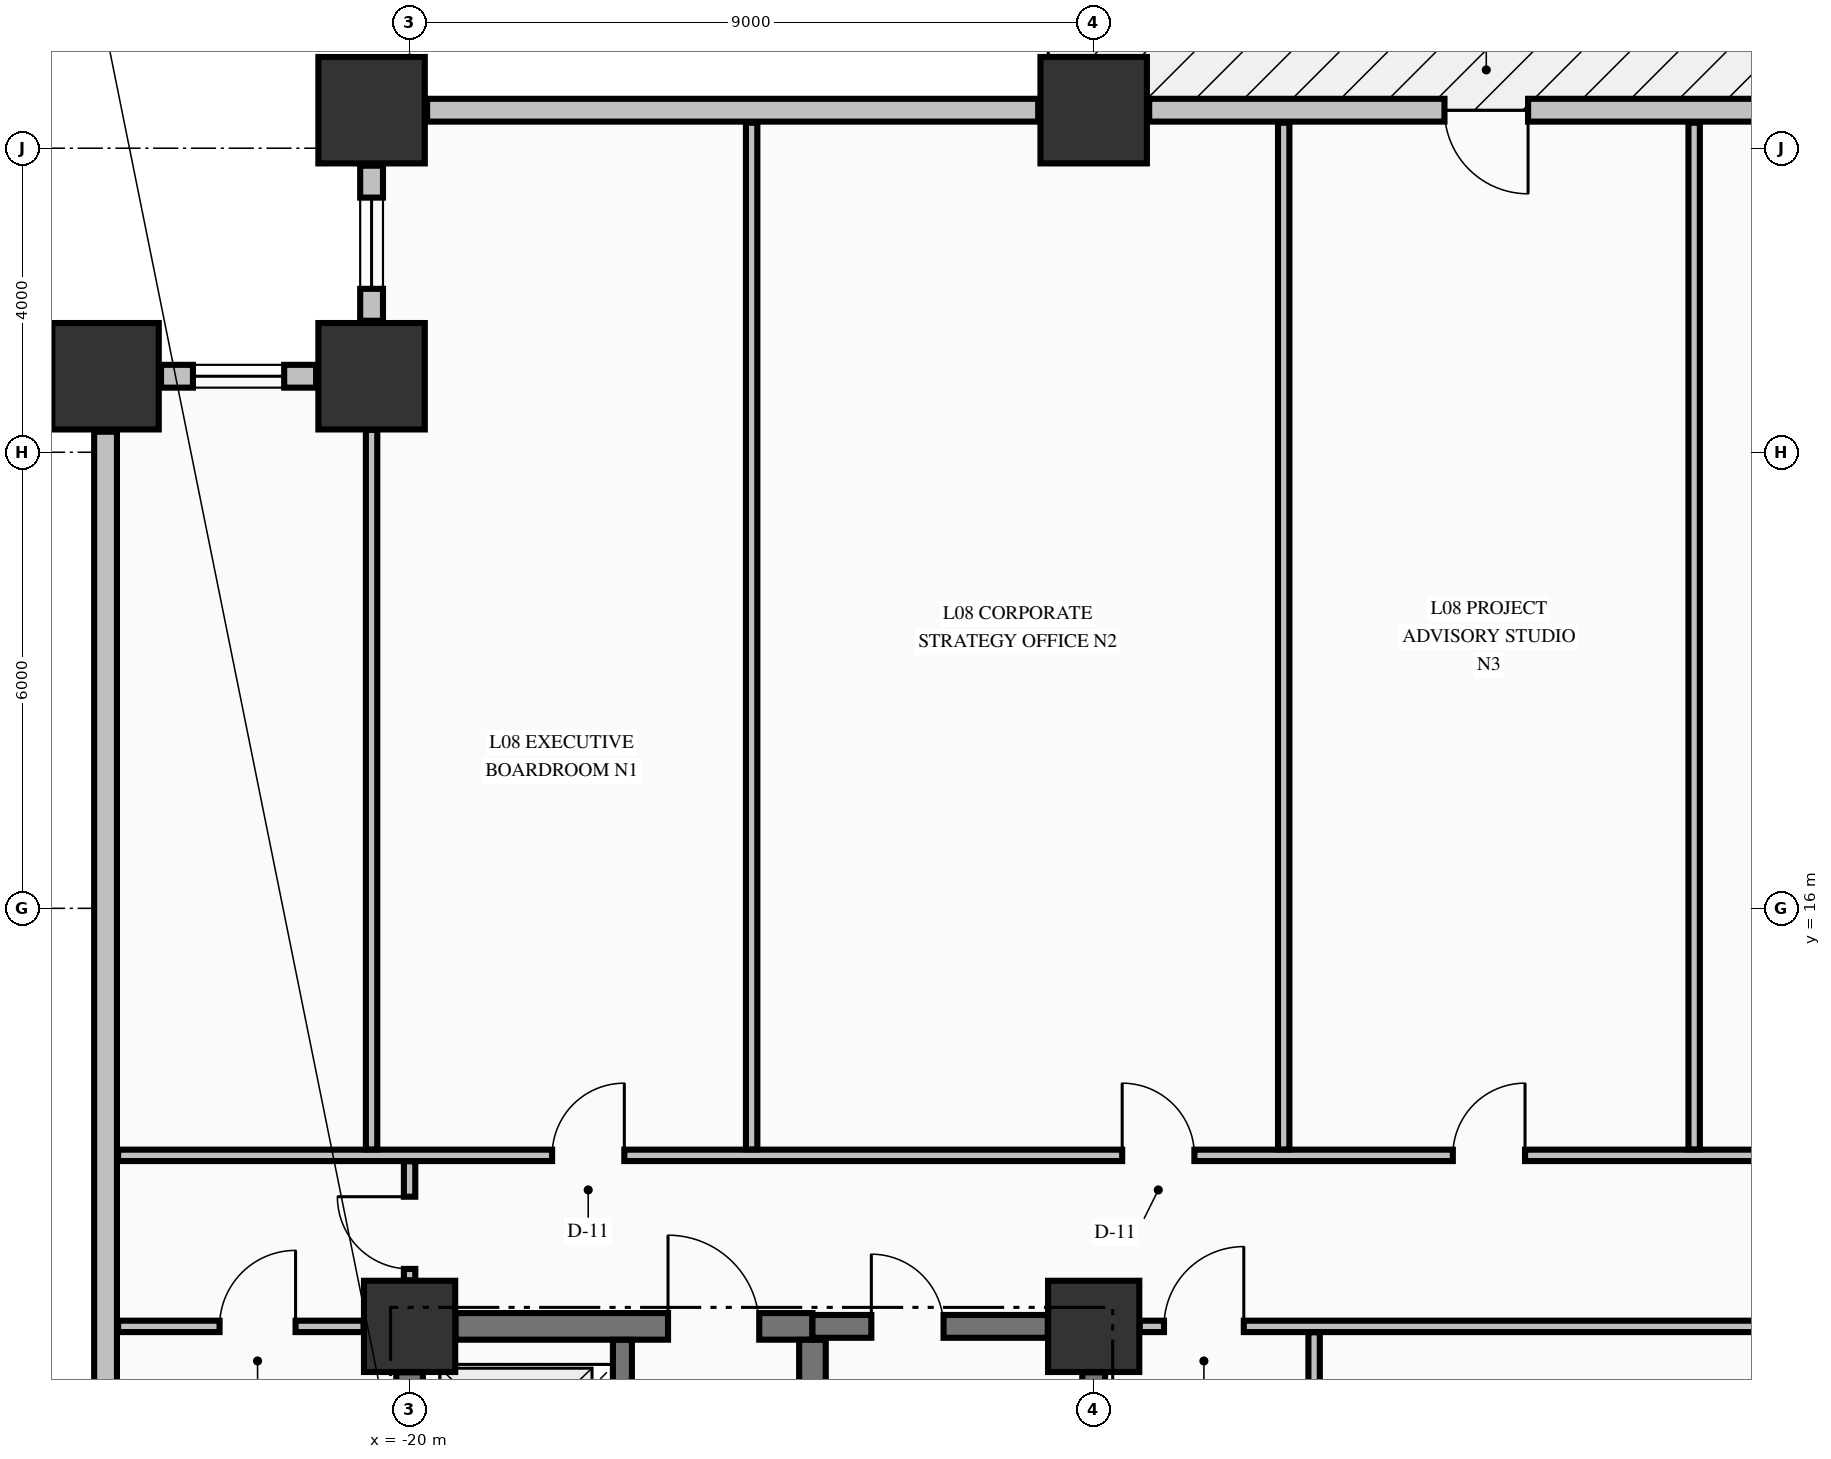
"""IFC4 building model, lengths in metres.
Left out: names, types, materials, properties, quantities, classifications, styles, units other than length and angle.
Written with IfcOpenShell. Run it as: python <this file> out.ifc"""

import sys

from ifc_helpers import new_model, si_unit, direction, frame, frame_2d, origin, origin_2d, place, context, subcontext, project, spatial, rectangle, extrude, element, fill, save


model = new_model("IFC4")
c1 = context("Model", 3, precision=1e-05, world=origin(), true_north=direction((0.0, 1.0)))
c2 = subcontext(c1, "Body", "Model", "MODEL_VIEW")
j1 = project(units=[si_unit("LENGTHUNIT", "METRE"), si_unit("PLANEANGLEUNIT", "RADIAN")], contexts=[c1])
p1 = place(None, origin())
s1 = spatial("IfcSite", under=j1, at=p1, CompositionType="ELEMENT")
p2 = place(p1, origin())
s2 = spatial("IfcBuilding", under=s1, at=p2, CompositionType="ELEMENT")
p3 = place(p2, frame((0.0, 0.0, 37.91)))
s3 = spatial("IfcBuildingStorey", under=s2, at=p3, CompositionType="ELEMENT", Elevation=37.91)
for number, where, z_axis, x_axis in (
    (1, (-20.5, 26.5, -0.25), (0.0, 0.0, 1.0), (1.0, 0.0, 0.0)),
    (2, (-11.0, 26.5, -0.25), (0.0, 0.0, 1.0), (1.0, 0.0, 0.0)),
    (3, (-24.0, 23.0, -0.25), (0.0, 0.0, 1.0), (1.0, 0.0, 0.0)),
    (4, (-20.5, 23.0, -0.25), (0.0, 0.0, 1.0), (1.0, 0.0, 0.0)),
):
    element("IfcColumn", number, at=place(p3, frame(where, z_axis=z_axis, x_axis=x_axis)), inside=s3, PredefinedType="COLUMN", context=c2, shape_type="SweptSolid", body=[
        extrude(rectangle(XDim=1.4, YDim=1.4, at=origin_2d()), origin(), (0.0, 0.0, 1.0), 3.57),
    ])
for number, where, z_axis, x_axis in (
    (5, (-20.0, 10.5, -0.25), (0.0, 0.0, 1.0), (1.0, 0.0, 0.0)),
    (6, (-11.0, 10.5, -0.25), (0.0, 0.0, 1.0), (1.0, 0.0, 0.0)),
):
    element("IfcColumn", number, at=place(p3, frame(where, z_axis=z_axis, x_axis=x_axis)), inside=s3, PredefinedType="COLUMN", context=c2, shape_type="SweptSolid", body=[
        extrude(rectangle(XDim=1.2, YDim=1.2, at=origin_2d()), origin(), (0.0, 0.0, 1.0), 3.57),
    ])
p4 = place(p3, frame((-20.5, 25.77, 0.0), z_axis=(0.0, 0.0, 1.0), x_axis=(0.0, -1.0, 0.0)))
e7 = element("IfcWall", 7, at=p4, inside=s3, PredefinedType="STANDARD", context=c2, shape_type="SweptSolid", body=[
    extrude(rectangle(XDim=2.04, YDim=0.3, at=frame_2d((1.02, 0.0))), origin(), (0.0, 0.0, 1.0), 2.712),
])
p5 = place(p4, frame((0.42, 0.0, 0.82)))
e8 = element("IfcOpeningElement", 8, at=p5, cuts=e7, PredefinedType="OPENING", context=c2, shape_type="SweptSolid", body=[
    extrude(rectangle(XDim=1.2, YDim=1.65, at=frame_2d((0.6, 0.825))), frame((0.0, 0.16, 0.0), z_axis=(0.0, -1.0, 0.0), x_axis=(1.0, 0.0, 0.0)), (0.0, 0.0, 1.0), 0.32),
])
p6 = place(p3, frame((-21.23, 23.0, 0.0), z_axis=(0.0, 0.0, 1.0), x_axis=(-1.0, 0.0, 0.0)))
e9 = element("IfcWall", 9, at=p6, inside=s3, PredefinedType="STANDARD", context=c2, shape_type="SweptSolid", body=[
    extrude(rectangle(XDim=2.04, YDim=0.3, at=frame_2d((1.02, 0.0))), origin(), (0.0, 0.0, 1.0), 2.712),
])
p7 = place(p6, frame((0.42, 0.0, 0.82)))
e10 = element("IfcOpeningElement", 10, at=p7, cuts=e9, PredefinedType="OPENING", context=c2, shape_type="SweptSolid", body=[
    extrude(rectangle(XDim=1.2, YDim=1.65, at=frame_2d((0.6, 0.825))), frame((0.0, 0.16, 0.0), z_axis=(0.0, -1.0, 0.0), x_axis=(1.0, 0.0, 0.0)), (0.0, 0.0, 1.0), 0.32),
])
p8 = place(p3, frame((-11.73, 26.5, 0.0), z_axis=(0.0, 0.0, 1.0), x_axis=(-1.0, 0.0, 0.0)))
e11 = element("IfcWall", 11, at=p8, inside=s3, PredefinedType="STANDARD", context=c2, shape_type="SweptSolid", body=[
    extrude(rectangle(XDim=8.04, YDim=0.3, at=frame_2d((4.02, 0.0))), origin(), (0.0, 0.0, 1.0), 2.712),
])
p9 = place(p3, frame((-0.73, 26.5, 0.0), z_axis=(0.0, 0.0, 1.0), x_axis=(-1.0, 0.0, 0.0)))
e12 = element("IfcWall", 12, at=p9, inside=s3, PredefinedType="STANDARD", context=c2, shape_type="SweptSolid", body=[
    extrude(rectangle(XDim=9.54, YDim=0.3, at=frame_2d((4.77, 0.0))), origin(), (0.0, 0.0, 1.0), 2.712),
])
p10 = place(p9, frame((4.555, 0.0, 0.0)))
e13 = element("IfcOpeningElement", 13, at=p10, cuts=e12, PredefinedType="OPENING", context=c2, shape_type="SweptSolid", body=[
    extrude(rectangle(XDim=1.1, YDim=2.15, at=frame_2d((0.55, 1.075))), frame((0.0, 0.16, 0.0), z_axis=(0.0, -1.0, 0.0), x_axis=(1.0, 0.0, 0.0)), (0.0, 0.0, 1.0), 0.32),
])
p11 = place(p3, frame((-24.0, 22.27, 0.0), z_axis=(0.0, 0.0, 1.0), x_axis=(0.0, -1.0, 0.0)))
e14 = element("IfcWall", 14, at=p11, inside=s3, PredefinedType="STANDARD", context=c2, shape_type="SweptSolid", body=[
    extrude(rectangle(XDim=12.54, YDim=0.3, at=frame_2d((6.27, 0.0))), origin(), (0.0, 0.0, 1.0), 2.712),
])
p12 = place(p3, frame((-19.396, 10.5, 0.0), z_axis=(0.0, 0.0, 1.0), x_axis=(1.0, 0.0, 0.0)))
e15 = element("IfcWall", 15, at=p12, inside=s3, PredefinedType="SHEAR", context=c2, shape_type="SweptSolid", body=[
    extrude(rectangle(XDim=4.696, YDim=0.35, at=frame_2d((2.348, 0.0))), origin(), (0.0, 0.0, 1.0), 3.32),
])
p13 = place(p12, frame((2.796, 0.0, 0.0)))
e16 = element("IfcOpeningElement", 16, at=p13, cuts=e15, PredefinedType="OPENING", context=c2, shape_type="SweptSolid", body=[
    extrude(rectangle(XDim=1.2, YDim=2.15, at=frame_2d((0.6, 1.075))), frame((0.0, 0.185, 0.0), z_axis=(0.0, -1.0, 0.0), x_axis=(1.0, 0.0, 0.0)), (0.0, 0.0, 1.0), 0.37),
])
p14 = place(p3, frame((-14.7, 10.5, 0.0), z_axis=(0.0, 0.0, 1.0), x_axis=(1.0, 0.0, 0.0)))
e17 = element("IfcWall", 17, at=p14, inside=s3, PredefinedType="SHEAR", context=c2, shape_type="SweptSolid", body=[
    extrude(rectangle(XDim=3.096, YDim=0.3, at=frame_2d((1.548, 0.0))), origin(), (0.0, 0.0, 1.0), 3.32),
])
p15 = place(p14, frame((0.775, 0.0, 0.0)))
e18 = element("IfcOpeningElement", 18, at=p15, cuts=e17, PredefinedType="OPENING", context=c2, shape_type="SweptSolid", body=[
    extrude(rectangle(XDim=0.95, YDim=2.15, at=frame_2d((0.475, 1.075))), frame((0.0, 0.16, 0.0), z_axis=(0.0, -1.0, 0.0), x_axis=(1.0, 0.0, 0.0)), (0.0, 0.0, 1.0), 0.32),
])
p16 = place(p3, frame((-23.835, 10.5, 0.0), z_axis=(0.0, 0.0, 1.0), x_axis=(1.0, 0.0, 0.0)))
e19 = element("IfcWall", 19, at=p16, inside=s3, PredefinedType="PARTITIONING", context=c2, shape_type="SweptSolid", body=[
    extrude(rectangle(XDim=3.229, YDim=0.15, at=frame_2d((1.615, 0.0))), origin(), (0.0, 0.0, 1.0), 3.32),
])
p17 = place(p16, frame((1.335, 0.0, 0.0)))
e20 = element("IfcOpeningElement", 20, at=p17, cuts=e19, PredefinedType="OPENING", context=c2, shape_type="SweptSolid", body=[
    extrude(rectangle(XDim=1.0, YDim=2.15, at=frame_2d((0.5, 1.075))), frame((0.0, 0.085, 0.0), z_axis=(0.0, -1.0, 0.0), x_axis=(1.0, 0.0, 0.0)), (0.0, 0.0, 1.0), 0.17),
])
p18 = place(p3, frame((-10.394, 10.5, 0.0), z_axis=(0.0, 0.0, 1.0), x_axis=(1.0, 0.0, 0.0)))
e21 = element("IfcWall", 21, at=p18, inside=s3, PredefinedType="PARTITIONING", context=c2, shape_type="SweptSolid", body=[
    extrude(rectangle(XDim=20.788, YDim=0.15, at=frame_2d((10.394, 0.0))), origin(), (0.0, 0.0, 1.0), 3.32),
])
p19 = place(p18, frame((0.319, 0.0, 0.0)))
e22 = element("IfcOpeningElement", 22, at=p19, cuts=e21, PredefinedType="OPENING", context=c2, shape_type="SweptSolid", body=[
    extrude(rectangle(XDim=1.05, YDim=2.15, at=frame_2d((0.525, 1.075))), frame((0.0, 0.085, 0.0), z_axis=(0.0, -1.0, 0.0), x_axis=(1.0, 0.0, 0.0)), (0.0, 0.0, 1.0), 0.17),
])
p20 = place(p18, frame((19.419, 0.0, 0.0)))
e23 = element("IfcOpeningElement", 23, at=p20, cuts=e21, PredefinedType="OPENING", context=c2, shape_type="SweptSolid", body=[
    extrude(rectangle(XDim=1.05, YDim=2.15, at=frame_2d((0.525, 1.075))), frame((0.0, 0.085, 0.0), z_axis=(0.0, -1.0, 0.0), x_axis=(1.0, 0.0, 0.0)), (0.0, 0.0, 1.0), 0.17),
])
p21 = place(p3, frame((-23.835, 12.75, 0.0), z_axis=(0.0, 0.0, 1.0), x_axis=(1.0, 0.0, 0.0)))
e24 = element("IfcWall", 24, at=p21, inside=s3, PredefinedType="PARTITIONING", context=c2, shape_type="SweptSolid", body=[
    extrude(rectangle(XDim=52.67, YDim=0.15, at=frame_2d((26.335, 0.0))), origin(), (0.0, 0.0, 1.0), 3.32),
])
p22 = place(p21, frame((5.71, 0.0, 0.0)))
e25 = element("IfcOpeningElement", 25, at=p22, cuts=e24, PredefinedType="OPENING", context=c2, shape_type="SweptSolid", body=[
    extrude(rectangle(XDim=0.95, YDim=2.15, at=frame_2d((0.475, 1.075))), frame((0.0, 0.085, 0.0), z_axis=(0.0, -1.0, 0.0), x_axis=(1.0, 0.0, 0.0)), (0.0, 0.0, 1.0), 0.17),
])
p23 = place(p21, frame((13.21, 0.0, 0.0)))
e26 = element("IfcOpeningElement", 26, at=p23, cuts=e24, PredefinedType="OPENING", context=c2, shape_type="SweptSolid", body=[
    extrude(rectangle(XDim=0.95, YDim=2.15, at=frame_2d((0.475, 1.075))), frame((0.0, 0.085, 0.0), z_axis=(0.0, -1.0, 0.0), x_axis=(1.0, 0.0, 0.0)), (0.0, 0.0, 1.0), 0.17),
])
p24 = place(p21, frame((17.56, 0.0, 0.0)))
e27 = element("IfcOpeningElement", 27, at=p24, cuts=e24, PredefinedType="OPENING", context=c2, shape_type="SweptSolid", body=[
    extrude(rectangle(XDim=0.95, YDim=2.15, at=frame_2d((0.475, 1.075))), frame((0.0, 0.085, 0.0), z_axis=(0.0, -1.0, 0.0), x_axis=(1.0, 0.0, 0.0)), (0.0, 0.0, 1.0), 0.17),
])
p25 = place(p21, frame((21.91, 0.0, 0.0)))
e28 = element("IfcOpeningElement", 28, at=p25, cuts=e24, PredefinedType="OPENING", context=c2, shape_type="SweptSolid", body=[
    extrude(rectangle(XDim=0.95, YDim=2.15, at=frame_2d((0.475, 1.075))), frame((0.0, 0.085, 0.0), z_axis=(0.0, -1.0, 0.0), x_axis=(1.0, 0.0, 0.0)), (0.0, 0.0, 1.0), 0.17),
])
p26 = place(p21, frame((31.21, 0.0, 0.0)))
e29 = element("IfcOpeningElement", 29, at=p26, cuts=e24, PredefinedType="OPENING", context=c2, shape_type="SweptSolid", body=[
    extrude(rectangle(XDim=1.05, YDim=2.15, at=frame_2d((0.525, 1.075))), frame((0.0, 0.085, 0.0), z_axis=(0.0, -1.0, 0.0), x_axis=(1.0, 0.0, 0.0)), (0.0, 0.0, 1.0), 0.17),
])
p27 = place(p21, frame((39.46, 0.0, 0.0)))
e30 = element("IfcOpeningElement", 30, at=p27, cuts=e24, PredefinedType="OPENING", context=c2, shape_type="SweptSolid", body=[
    extrude(rectangle(XDim=1.05, YDim=2.15, at=frame_2d((0.525, 1.075))), frame((0.0, 0.085, 0.0), z_axis=(0.0, -1.0, 0.0), x_axis=(1.0, 0.0, 0.0)), (0.0, 0.0, 1.0), 0.17),
])
p28 = place(p3, frame((-20.0, 7.727, 0.0), z_axis=(0.0, 0.0, 1.0), x_axis=(0.0, 1.0, 0.0)))
e31 = element("IfcWall", 31, at=p28, inside=s3, PredefinedType="SHEAR", context=c2, shape_type="SweptSolid", body=[
    extrude(rectangle(XDim=2.169, YDim=0.35, at=frame_2d((1.084, 0.0))), origin(), (0.0, 0.0, 1.0), 3.32),
])
p29 = place(p3, frame((-17.2, 7.727, 0.0), z_axis=(0.0, 0.0, 1.0), x_axis=(0.0, 1.0, 0.0)))
e32 = element("IfcWall", 32, at=p29, inside=s3, PredefinedType="SOLIDWALL", context=c2, shape_type="SweptSolid", body=[
    extrude(rectangle(XDim=2.596, YDim=0.25, at=frame_2d((1.298, 0.0))), origin(), (0.0, 0.0, 1.0), 3.32),
])
p30 = place(p29, frame((0.773, 0.0, 0.0)))
e33 = element("IfcOpeningElement", 33, at=p30, cuts=e32, PredefinedType="OPENING", context=c2, shape_type="SweptSolid", body=[
    extrude(rectangle(XDim=1.1, YDim=2.2, at=frame_2d((0.55, 1.1))), frame((0.0, 0.135, 0.0), z_axis=(0.0, -1.0, 0.0), x_axis=(1.0, 0.0, 0.0)), (0.0, 0.0, 1.0), 0.27),
])
p31 = place(p3, frame((-14.7, 5.852, 0.0), z_axis=(0.0, 0.0, 1.0), x_axis=(0.0, 1.0, 0.0)))
e34 = element("IfcWall", 34, at=p31, inside=s3, PredefinedType="SHEAR", context=c2, shape_type="SweptSolid", body=[
    extrude(rectangle(XDim=4.471, YDim=0.35, at=frame_2d((2.235, 0.0))), origin(), (0.0, 0.0, 1.0), 3.32),
])
p32 = place(p3, frame((-11.0, 5.852, 0.0), z_axis=(0.0, 0.0, 1.0), x_axis=(0.0, 1.0, 0.0)))
e35 = element("IfcWall", 35, at=p32, inside=s3, PredefinedType="SHEAR", context=c2, shape_type="SweptSolid", body=[
    extrude(rectangle(XDim=4.044, YDim=0.3, at=frame_2d((2.022, 0.0))), origin(), (0.0, 0.0, 1.0), 3.32),
])
p33 = place(p3, frame((-20.5, 12.828, 0.0), z_axis=(0.0, 0.0, 1.0), x_axis=(0.0, 1.0, 0.0)))
e36 = element("IfcWall", 36, at=p33, inside=s3, PredefinedType="PARTITIONING", context=c2, shape_type="SweptSolid", body=[
    extrude(rectangle(XDim=9.466, YDim=0.15, at=frame_2d((4.733, 0.0))), origin(), (0.0, 0.0, 1.0), 3.32),
])
p34 = place(p3, frame((-20.0, 11.106, 0.0), z_axis=(0.0, 0.0, 1.0), x_axis=(0.0, 1.0, 0.0)))
e37 = element("IfcWall", 37, at=p34, inside=s3, PredefinedType="PARTITIONING", context=c2, shape_type="SweptSolid", body=[
    extrude(rectangle(XDim=1.566, YDim=0.15, at=frame_2d((0.783, 0.0))), origin(), (0.0, 0.0, 1.0), 3.32),
])
p35 = place(p34, frame((0.15, 0.0, 0.0)))
e38 = element("IfcOpeningElement", 38, at=p35, cuts=e37, PredefinedType="OPENING", context=c2, shape_type="SweptSolid", body=[
    extrude(rectangle(XDim=0.95, YDim=2.15, at=frame_2d((0.475, 1.075))), frame((0.0, 0.085, 0.0), z_axis=(0.0, -1.0, 0.0), x_axis=(1.0, 0.0, 0.0)), (0.0, 0.0, 1.0), 0.17),
])
for number, where, z_axis, x_axis in (
    (39, (-15.5, 12.828, 0.0), (0.0, 0.0, 1.0), (0.0, 1.0, 0.0)),
    (40, (-8.5, 12.828, 0.0), (0.0, 0.0, 1.0), (0.0, 1.0, 0.0)),
):
    element("IfcWall", number, at=place(p3, frame(where, z_axis=z_axis, x_axis=x_axis)), inside=s3, PredefinedType="PARTITIONING", context=c2, shape_type="SweptSolid", body=[
        extrude(rectangle(XDim=13.507, YDim=0.15, at=frame_2d((6.753, 0.0))), origin(), (0.0, 0.0, 1.0), 3.32),
    ])
p36 = place(p3, frame((-8.1, 0.903, 0.0), z_axis=(0.0, 0.0, 1.0), x_axis=(0.0, 1.0, 0.0)))
e41 = element("IfcWall", 41, at=p36, inside=s3, PredefinedType="PARTITIONING", context=c2, shape_type="SweptSolid", body=[
    extrude(rectangle(XDim=9.519, YDim=0.15, at=frame_2d((4.76, 0.0))), origin(), (0.0, 0.0, 1.0), 3.32),
])
p37 = place(p36, frame((4.222, 0.0, 0.0)))
e42 = element("IfcOpeningElement", 42, at=p37, cuts=e41, PredefinedType="OPENING", context=c2, shape_type="SweptSolid", body=[
    extrude(rectangle(XDim=1.05, YDim=2.15, at=frame_2d((0.525, 1.075))), frame((0.0, 0.085, 0.0), z_axis=(0.0, -1.0, 0.0), x_axis=(1.0, 0.0, 0.0)), (0.0, 0.0, 1.0), 0.17),
])
p38 = place(p3, frame((-3.1, 12.828, 0.0), z_axis=(0.0, 0.0, 1.0), x_axis=(0.0, 1.0, 0.0)))
e43 = element("IfcWall", 43, at=p38, inside=s3, PredefinedType="PARTITIONING", context=c2, shape_type="SweptSolid", body=[
    extrude(rectangle(XDim=13.507, YDim=0.15, at=frame_2d((6.753, 0.0))), origin(), (0.0, 0.0, 1.0), 3.32),
])
p39 = place(p5, origin())
e44 = element("IfcWindow", 44, at=p39, inside=s3, PartitioningType="SINGLE_PANEL", PredefinedType="WINDOW", context=c2, shape_type="SweptSolid", body=[
    extrude(rectangle(XDim=1.2, YDim=1.65, at=frame_2d((0.6, 0.825))), frame((0.0, 0.03, 0.0), z_axis=(0.0, -1.0, 0.0), x_axis=(1.0, 0.0, 0.0)), (0.0, 0.0, 1.0), 0.06),
])
fill(e8, e44)
p40 = place(p7, origin())
e45 = element("IfcWindow", 45, at=p40, inside=s3, PartitioningType="SINGLE_PANEL", PredefinedType="WINDOW", context=c2, shape_type="SweptSolid", body=[
    extrude(rectangle(XDim=1.2, YDim=1.65, at=frame_2d((0.6, 0.825))), frame((0.0, 0.03, 0.0), z_axis=(0.0, -1.0, 0.0), x_axis=(1.0, 0.0, 0.0)), (0.0, 0.0, 1.0), 0.06),
])
fill(e10, e45)
p41 = place(p10, origin())
e46 = element("IfcDoor", 46, at=p41, inside=s3, OperationType="SINGLE_SWING_LEFT", PredefinedType="DOOR", context=c2, shape_type="SweptSolid", body=[
    extrude(rectangle(XDim=1.1, YDim=2.15, at=frame_2d((0.55, 1.075))), frame((0.0, 0.025, 0.0), z_axis=(0.0, -1.0, 0.0), x_axis=(1.0, 0.0, 0.0)), (0.0, 0.0, 1.0), 0.05),
])
fill(e13, e46)
p42 = place(p15, origin())
e47 = element("IfcDoor", 47, at=p42, inside=s3, OperationType="SINGLE_SWING_LEFT", PredefinedType="DOOR", context=c2, shape_type="SweptSolid", body=[
    extrude(rectangle(XDim=0.95, YDim=2.15, at=frame_2d((0.475, 1.075))), frame((0.0, 0.025, 0.0), z_axis=(0.0, -1.0, 0.0), x_axis=(1.0, 0.0, 0.0)), (0.0, 0.0, 1.0), 0.05),
])
fill(e18, e47)
p43 = place(p13, origin())
e48 = element("IfcDoor", 48, at=p43, inside=s3, OperationType="SINGLE_SWING_LEFT", PredefinedType="DOOR", context=c2, shape_type="SweptSolid", body=[
    extrude(rectangle(XDim=1.2, YDim=2.15, at=frame_2d((0.6, 1.075))), frame((0.0, 0.025, 0.0), z_axis=(0.0, -1.0, 0.0), x_axis=(1.0, 0.0, 0.0)), (0.0, 0.0, 1.0), 0.05),
])
fill(e16, e48)
p44 = place(p19, origin())
e49 = element("IfcDoor", 49, at=p44, inside=s3, OperationType="SINGLE_SWING_RIGHT", PredefinedType="DOOR", context=c2, shape_type="SweptSolid", body=[
    extrude(rectangle(XDim=1.05, YDim=2.15, at=frame_2d((0.525, 1.075))), frame((0.0, 0.025, 0.0), z_axis=(0.0, -1.0, 0.0), x_axis=(1.0, 0.0, 0.0)), (0.0, 0.0, 1.0), 0.05),
])
fill(e22, e49)
p45 = place(p22, origin())
e50 = element("IfcDoor", 50, at=p45, inside=s3, OperationType="SINGLE_SWING_RIGHT", PredefinedType="DOOR", context=c2, shape_type="SweptSolid", body=[
    extrude(rectangle(XDim=0.95, YDim=2.15, at=frame_2d((0.475, 1.075))), frame((0.0, 0.025, 0.0), z_axis=(0.0, -1.0, 0.0), x_axis=(1.0, 0.0, 0.0)), (0.0, 0.0, 1.0), 0.05),
])
fill(e25, e50)
p46 = place(p23, origin())
e51 = element("IfcDoor", 51, at=p46, inside=s3, OperationType="SINGLE_SWING_LEFT", PredefinedType="DOOR", context=c2, shape_type="SweptSolid", body=[
    extrude(rectangle(XDim=0.95, YDim=2.15, at=frame_2d((0.475, 1.075))), frame((0.0, 0.025, 0.0), z_axis=(0.0, -1.0, 0.0), x_axis=(1.0, 0.0, 0.0)), (0.0, 0.0, 1.0), 0.05),
])
fill(e26, e51)
p47 = place(p24, origin())
e52 = element("IfcDoor", 52, at=p47, inside=s3, OperationType="SINGLE_SWING_RIGHT", PredefinedType="DOOR", context=c2, shape_type="SweptSolid", body=[
    extrude(rectangle(XDim=0.95, YDim=2.15, at=frame_2d((0.475, 1.075))), frame((0.0, 0.025, 0.0), z_axis=(0.0, -1.0, 0.0), x_axis=(1.0, 0.0, 0.0)), (0.0, 0.0, 1.0), 0.05),
])
fill(e27, e52)
p48 = place(p35, origin())
e53 = element("IfcDoor", 53, at=p48, inside=s3, OperationType="SINGLE_SWING_RIGHT", PredefinedType="DOOR", context=c2, shape_type="SweptSolid", body=[
    extrude(rectangle(XDim=0.95, YDim=2.15, at=frame_2d((0.475, 1.075))), frame((0.0, 0.025, 0.0), z_axis=(0.0, -1.0, 0.0), x_axis=(1.0, 0.0, 0.0)), (0.0, 0.0, 1.0), 0.05),
])
fill(e38, e53)
p49 = place(p17, origin())
e54 = element("IfcDoor", 54, at=p49, inside=s3, OperationType="SINGLE_SWING_RIGHT", PredefinedType="DOOR", context=c2, shape_type="SweptSolid", body=[
    extrude(rectangle(XDim=1.0, YDim=2.15, at=frame_2d((0.5, 1.075))), frame((0.0, 0.025, 0.0), z_axis=(0.0, -1.0, 0.0), x_axis=(1.0, 0.0, 0.0)), (0.0, 0.0, 1.0), 0.05),
])
fill(e20, e54)
save(model, sys.argv[1])
